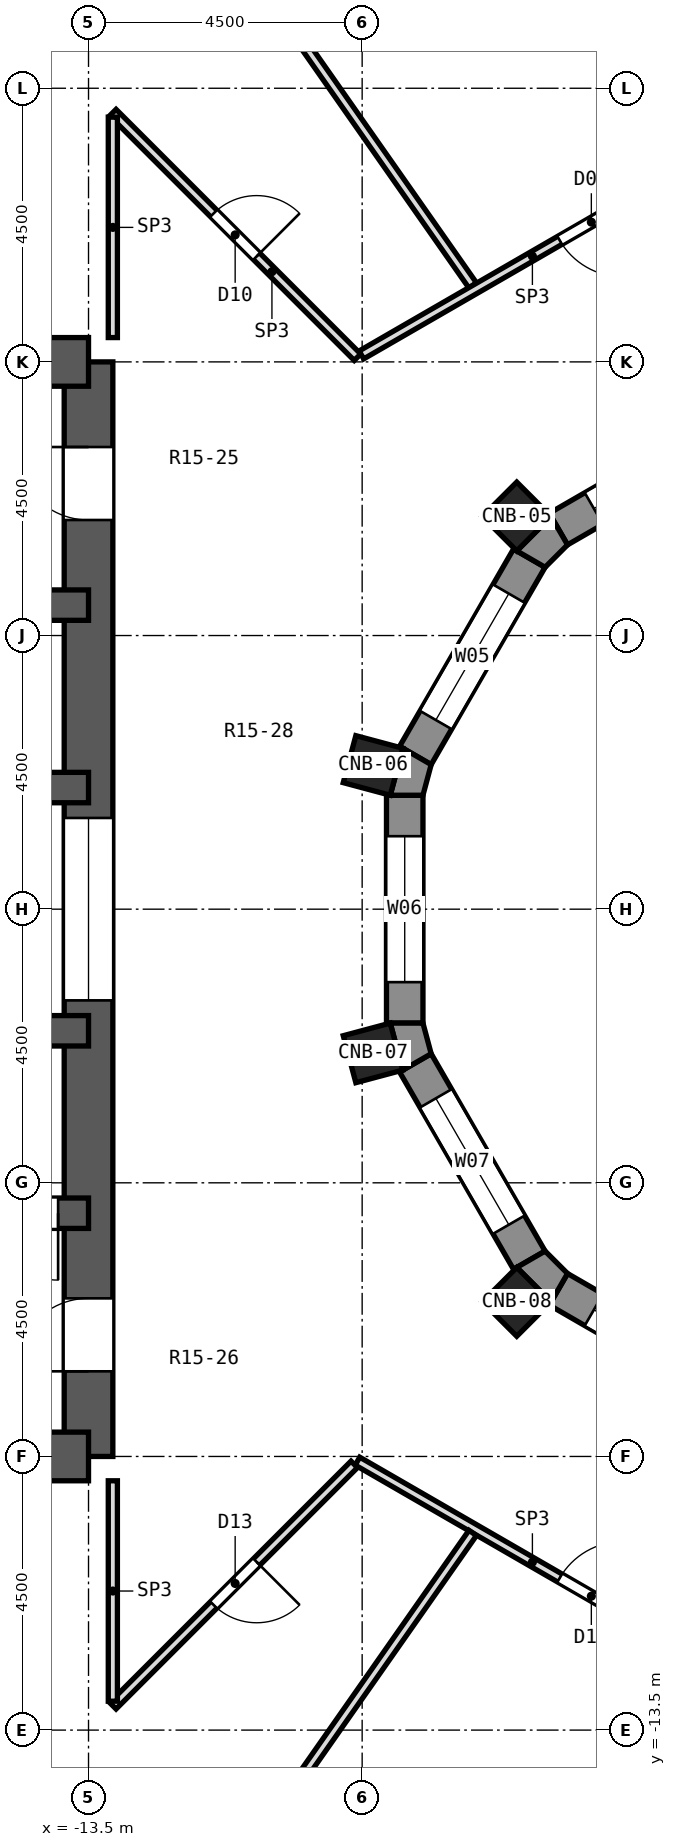
"""IFC4 building model, lengths in metres.
Left out: names, types, materials, properties, quantities, classifications, styles, units other than length and angle.
Written with IfcOpenShell. Run it as: python <this file> out.ifc"""

import sys

from ifc_helpers import new_model, si_unit, direction, frame, frame_2d, origin, origin_2d, place, context, subcontext, project, spatial, polyline, rectangle, outline, extrude, element, fill, save


model = new_model("IFC4")
c1 = context("Model", 3, precision=1e-05, world=origin(), true_north=direction((0.0, 1.0)))
c2 = subcontext(c1, "Body", "Model", "MODEL_VIEW")
j1 = project(units=[si_unit("LENGTHUNIT", "METRE"), si_unit("PLANEANGLEUNIT", "RADIAN")], contexts=[c1])
p1 = place(None, origin())
s1 = spatial("IfcSite", under=j1, at=p1, CompositionType="ELEMENT")
p2 = place(p1, origin())
s2 = spatial("IfcBuilding", under=s1, at=p2, CompositionType="ELEMENT")
p3 = place(p2, frame((0.0, 0.0, 82.4)))
s3 = spatial("IfcBuildingStorey", under=s2, at=p3, CompositionType="ELEMENT", Elevation=82.4)
for number, where, z_axis, x_axis in (
    (1, (-6.458, 6.458, 0.0), (0.0, 0.0, 1.0), (-0.707, 0.707, 0.0)),
    (2, (-8.821, 2.364, 0.0), (0.0, 0.0, 1.0), (-0.966, 0.259, 0.0)),
    (3, (-8.821, -2.364, 0.0), (0.0, 0.0, 1.0), (-0.966, -0.259, 0.0)),
    (4, (-6.458, -6.458, 0.0), (0.0, 0.0, 1.0), (-0.707, -0.707, 0.0)),
):
    element("IfcColumn", number, at=place(p3, frame(where, z_axis=z_axis, x_axis=x_axis)), inside=s3, PredefinedType="COLUMN", context=c2, shape_type="SweptSolid", body=[
        extrude(rectangle(XDim=0.8, YDim=0.8, at=origin_2d()), origin(), (0.0, 0.0, 1.0), 4.5),
    ])
p4 = place(p3, frame((-13.5, -9.0, 0.0), z_axis=(0.0, 0.0, 1.0), x_axis=(0.0, 1.0, 0.0)))
e5 = element("IfcWall", 5, at=p4, inside=s3, PredefinedType="SHEAR", context=c2, shape_type="SweptSolid", body=[
    extrude(rectangle(XDim=18.0, YDim=0.8, at=frame_2d((9.0, 0.0))), origin(), (0.0, 0.0, 1.0), 4.5),
])
p5 = place(p4, frame((15.4, 0.0, 0.0)))
e6 = element("IfcOpeningElement", 6, at=p5, cuts=e5, PredefinedType="OPENING", context=c2, shape_type="SweptSolid", body=[
    extrude(rectangle(XDim=1.2, YDim=2.1, at=frame_2d((0.6, 1.05))), frame((0.0, 0.412, 0.0), z_axis=(0.0, -1.0, 0.0), x_axis=(1.0, 0.0, 0.0)), (0.0, 0.0, 1.0), 0.824),
])
p6 = place(p4, frame((1.4, 0.0, 0.0)))
e7 = element("IfcOpeningElement", 7, at=p6, cuts=e5, PredefinedType="OPENING", context=c2, shape_type="SweptSolid", body=[
    extrude(rectangle(XDim=1.2, YDim=2.1, at=frame_2d((0.6, 1.05))), frame((0.0, 0.412, 0.0), z_axis=(0.0, -1.0, 0.0), x_axis=(1.0, 0.0, 0.0)), (0.0, 0.0, 1.0), 0.824),
])
p7 = place(p4, frame((7.5, 0.0, 0.0)))
e8 = element("IfcOpeningElement", 8, at=p7, cuts=e5, PredefinedType="OPENING", context=c2, shape_type="SweptSolid", body=[
    extrude(rectangle(XDim=3.0, YDim=2.4, at=frame_2d((1.5, 1.2))), frame((0.0, 0.412, 0.0), z_axis=(0.0, -1.0, 0.0), x_axis=(1.0, 0.0, 0.0)), (0.0, 0.0, 1.0), 0.824),
])
for number, where, z_axis, x_axis in (
    (9, (-13.5, 9.0, 0.0), (0.0, 0.0, 1.0), (-1.0, 0.0, 0.0)),
    (10, (-13.5, -9.0, 0.0), (0.0, 0.0, 1.0), (-1.0, 0.0, 0.0)),
):
    element("IfcWall", number, at=place(p3, frame(where, z_axis=z_axis, x_axis=x_axis)), inside=s3, PredefinedType="SHEAR", context=c2, shape_type="SweptSolid", body=[
        extrude(rectangle(XDim=10.4, YDim=0.8, at=frame_2d((5.2, 0.0))), origin(), (0.0, 0.0, 1.0), 4.5),
    ])
p8 = place(p3, frame((-13.5, 5.0, 0.0), z_axis=(0.0, 0.0, 1.0), x_axis=(-1.0, 0.0, 0.0)))
e11 = element("IfcWall", 11, at=p8, inside=s3, PredefinedType="SHEAR", context=c2, shape_type="SweptSolid", body=[
    extrude(rectangle(XDim=10.4, YDim=0.5, at=frame_2d((5.2, 0.0))), origin(), (0.0, 0.0, 1.0), 4.5),
])
p9 = place(p3, frame((-13.5, -5.0, 0.0), z_axis=(0.0, 0.0, 1.0), x_axis=(-1.0, 0.0, 0.0)))
e12 = element("IfcWall", 12, at=p9, inside=s3, PredefinedType="SHEAR", context=c2, shape_type="SweptSolid", body=[
    extrude(rectangle(XDim=10.4, YDim=0.5, at=frame_2d((5.2, 0.0))), origin(), (0.0, 0.0, 1.0), 4.5),
])
p10 = place(p9, frame((0.5, 0.0, 0.0)))
e13 = element("IfcOpeningElement", 13, at=p10, cuts=e12, PredefinedType="OPENING", context=c2, shape_type="SweptSolid", body=[
    extrude(rectangle(XDim=1.1, YDim=2.1, at=frame_2d((0.55, 1.05))), frame((0.0, 0.262, 0.0), z_axis=(0.0, -1.0, 0.0), x_axis=(1.0, 0.0, 0.0)), (0.0, 0.0, 1.0), 0.524),
])
p11 = place(p3, frame((-13.5, 2.0, 0.0), z_axis=(0.0, 0.0, 1.0), x_axis=(-1.0, 0.0, 0.0)))
e14 = element("IfcWall", 14, at=p11, inside=s3, PredefinedType="SHEAR", context=c2, shape_type="SweptSolid", body=[
    extrude(rectangle(XDim=10.4, YDim=0.5, at=frame_2d((5.2, 0.0))), origin(), (0.0, 0.0, 1.0), 4.5),
])
p12 = place(p11, frame((7.65, 0.0, 0.0)))
e15 = element("IfcOpeningElement", 15, at=p12, cuts=e14, PredefinedType="OPENING", context=c2, shape_type="SweptSolid", body=[
    extrude(rectangle(XDim=1.1, YDim=2.1, at=frame_2d((0.55, 1.05))), frame((0.0, 0.262, 0.0), z_axis=(0.0, -1.0, 0.0), x_axis=(1.0, 0.0, 0.0)), (0.0, 0.0, 1.0), 0.524),
])
p13 = place(p11, frame((1.511, 0.0, 0.0)))
e16 = element("IfcOpeningElement", 16, at=p13, cuts=e14, PredefinedType="OPENING", context=c2, shape_type="SweptSolid", body=[
    extrude(rectangle(XDim=0.9, YDim=2.1, at=frame_2d((0.45, 1.05))), frame((0.0, 0.262, 0.0), z_axis=(0.0, -1.0, 0.0), x_axis=(1.0, 0.0, 0.0)), (0.0, 0.0, 1.0), 0.524),
])
p14 = place(p11, frame((3.841, 0.0, 0.0)))
e17 = element("IfcOpeningElement", 17, at=p14, cuts=e14, PredefinedType="OPENING", context=c2, shape_type="SweptSolid", body=[
    extrude(rectangle(XDim=0.9, YDim=2.1, at=frame_2d((0.45, 1.05))), frame((0.0, 0.262, 0.0), z_axis=(0.0, -1.0, 0.0), x_axis=(1.0, 0.0, 0.0)), (0.0, 0.0, 1.0), 0.524),
])
p15 = place(p3, frame((-13.5, -2.0, 0.0), z_axis=(0.0, 0.0, 1.0), x_axis=(-1.0, 0.0, 0.0)))
e18 = element("IfcWall", 18, at=p15, inside=s3, PredefinedType="SHEAR", context=c2, shape_type="SweptSolid", body=[
    extrude(rectangle(XDim=10.4, YDim=0.5, at=frame_2d((5.2, 0.0))), origin(), (0.0, 0.0, 1.0), 4.5),
])
p16 = place(p15, frame((5.62, 0.0, 0.0)))
e19 = element("IfcOpeningElement", 19, at=p16, cuts=e18, PredefinedType="OPENING", context=c2, shape_type="SweptSolid", body=[
    extrude(rectangle(XDim=1.1, YDim=2.1, at=frame_2d((0.55, 1.05))), frame((0.0, 0.262, 0.0), z_axis=(0.0, -1.0, 0.0), x_axis=(1.0, 0.0, 0.0)), (0.0, 0.0, 1.0), 0.524),
])
p17 = place(p15, frame((7.65, 0.0, 0.0)))
e20 = element("IfcOpeningElement", 20, at=p17, cuts=e18, PredefinedType="OPENING", context=c2, shape_type="SweptSolid", body=[
    extrude(rectangle(XDim=1.1, YDim=2.1, at=frame_2d((0.55, 1.05))), frame((0.0, 0.262, 0.0), z_axis=(0.0, -1.0, 0.0), x_axis=(1.0, 0.0, 0.0)), (0.0, 0.0, 1.0), 0.524),
])
p18 = place(p15, frame((1.215, 0.0, 0.0)))
e21 = element("IfcOpeningElement", 21, at=p18, cuts=e18, PredefinedType="OPENING", context=c2, shape_type="SweptSolid", body=[
    extrude(rectangle(XDim=1.0, YDim=2.1, at=frame_2d((0.5, 1.05))), frame((0.0, 0.262, 0.0), z_axis=(0.0, -1.0, 0.0), x_axis=(1.0, 0.0, 0.0)), (0.0, 0.0, 1.0), 0.524),
])
p19 = place(p3, frame((-2.527, 8.125, 0.0), z_axis=(0.0, 0.0, 1.0), x_axis=(-0.86604563398, -0.499964958637, 0.0)))
e22 = element("IfcWall", 22, at=p19, inside=s3, PredefinedType="SOLIDWALL", context=c2, shape_type="SweptSolid", body=[
    extrude(rectangle(XDim=3.747, YDim=0.6, at=frame_2d((1.874, 0.0))), origin(), (0.0, 0.0, 1.0), 3.95),
])
p20 = place(p19, frame((0.674, 0.0, 1.5)))
e23 = element("IfcOpeningElement", 23, at=p20, cuts=e22, PredefinedType="OPENING", context=c2, shape_type="SweptSolid", body=[
    extrude(rectangle(XDim=2.4, YDim=2.0, at=frame_2d((1.2, 1.0))), frame((0.0, 0.312, 0.0), z_axis=(0.0, -1.0, 0.0), x_axis=(1.0, 0.0, 0.0)), (0.0, 0.0, 1.0), 0.624),
])
p21 = place(p3, frame((-6.251, 5.773, 0.0), z_axis=(0.0, 0.0, 1.0), x_axis=(-0.499964958637, -0.86604563398, 0.0)))
e24 = element("IfcWall", 24, at=p21, inside=s3, PredefinedType="SOLIDWALL", context=c2, shape_type="SweptSolid", body=[
    extrude(rectangle(XDim=3.747, YDim=0.6, at=frame_2d((1.874, 0.0))), origin(), (0.0, 0.0, 1.0), 3.95),
])
p22 = place(p21, frame((0.674, 0.0, 1.5)))
e25 = element("IfcOpeningElement", 25, at=p22, cuts=e24, PredefinedType="OPENING", context=c2, shape_type="SweptSolid", body=[
    extrude(rectangle(XDim=2.4, YDim=2.0, at=frame_2d((1.2, 1.0))), frame((0.0, 0.312, 0.0), z_axis=(0.0, -1.0, 0.0), x_axis=(1.0, 0.0, 0.0)), (0.0, 0.0, 1.0), 0.624),
])
p23 = place(p3, frame((-8.3, 1.874, 0.0), z_axis=(0.0, 0.0, 1.0), x_axis=(0.0, -1.0, 0.0)))
e26 = element("IfcWall", 26, at=p23, inside=s3, PredefinedType="SOLIDWALL", context=c2, shape_type="SweptSolid", body=[
    extrude(rectangle(XDim=3.748, YDim=0.6, at=frame_2d((1.874, 0.0))), origin(), (0.0, 0.0, 1.0), 3.95),
])
p24 = place(p23, frame((0.674, 0.0, 1.5)))
e27 = element("IfcOpeningElement", 27, at=p24, cuts=e26, PredefinedType="OPENING", context=c2, shape_type="SweptSolid", body=[
    extrude(rectangle(XDim=2.4, YDim=2.0, at=frame_2d((1.2, 1.0))), frame((0.0, 0.312, 0.0), z_axis=(0.0, -1.0, 0.0), x_axis=(1.0, 0.0, 0.0)), (0.0, 0.0, 1.0), 0.624),
])
p25 = place(p3, frame((-8.125, -2.527, 0.0), z_axis=(0.0, 0.0, 1.0), x_axis=(0.499964958637, -0.86604563398, 0.0)))
e28 = element("IfcWall", 28, at=p25, inside=s3, PredefinedType="SOLIDWALL", context=c2, shape_type="SweptSolid", body=[
    extrude(rectangle(XDim=3.747, YDim=0.6, at=frame_2d((1.874, 0.0))), origin(), (0.0, 0.0, 1.0), 3.95),
])
p26 = place(p25, frame((0.674, 0.0, 1.5)))
e29 = element("IfcOpeningElement", 29, at=p26, cuts=e28, PredefinedType="OPENING", context=c2, shape_type="SweptSolid", body=[
    extrude(rectangle(XDim=2.4, YDim=2.0, at=frame_2d((1.2, 1.0))), frame((0.0, 0.312, 0.0), z_axis=(0.0, -1.0, 0.0), x_axis=(1.0, 0.0, 0.0)), (0.0, 0.0, 1.0), 0.624),
])
p27 = place(p3, frame((-5.773, -6.251, 0.0), z_axis=(0.0, 0.0, 1.0), x_axis=(0.86604563398, -0.499964958637, 0.0)))
e30 = element("IfcWall", 30, at=p27, inside=s3, PredefinedType="SOLIDWALL", context=c2, shape_type="SweptSolid", body=[
    extrude(rectangle(XDim=3.747, YDim=0.6, at=frame_2d((1.874, 0.0))), origin(), (0.0, 0.0, 1.0), 3.95),
])
p28 = place(p27, frame((0.674, 0.0, 1.5)))
e31 = element("IfcOpeningElement", 31, at=p28, cuts=e30, PredefinedType="OPENING", context=c2, shape_type="SweptSolid", body=[
    extrude(rectangle(XDim=2.4, YDim=2.0, at=frame_2d((1.2, 1.0))), frame((0.0, 0.312, 0.0), z_axis=(0.0, -1.0, 0.0), x_axis=(1.0, 0.0, 0.0)), (0.0, 0.0, 1.0), 0.624),
])
p29 = place(p3, origin())
e32 = element("IfcWall", 32, at=p29, inside=s3, PredefinedType="SOLIDWALL", context=c2, shape_type="SweptSolid", body=[
    extrude(outline(polyline([(-6.458, 5.892), (-5.991, 5.623), (-5.623, 5.991), (-5.892, 6.458), (-6.458, 5.892)])), origin(), (0.0, 0.0, 1.0), 3.95),
])
p30 = place(p3, origin())
e33 = element("IfcWall", 33, at=p30, inside=s3, PredefinedType="SOLIDWALL", context=c2, shape_type="SweptSolid", body=[
    extrude(outline(polyline([(-8.538, 1.874), (-8.0, 1.874), (-7.865, 2.377), (-8.331, 2.646), (-8.538, 1.874)])), origin(), (0.0, 0.0, 1.0), 3.95),
])
p31 = place(p3, origin())
e34 = element("IfcWall", 34, at=p31, inside=s3, PredefinedType="SOLIDWALL", context=c2, shape_type="SweptSolid", body=[
    extrude(outline(polyline([(-8.331, -2.646), (-7.865, -2.377), (-8.0, -1.874), (-8.538, -1.874), (-8.331, -2.646)])), origin(), (0.0, 0.0, 1.0), 3.95),
])
p32 = place(p3, origin())
e35 = element("IfcWall", 35, at=p32, inside=s3, PredefinedType="SOLIDWALL", context=c2, shape_type="SweptSolid", body=[
    extrude(outline(polyline([(-6.458, -5.892), (-5.892, -6.458), (-5.623, -5.991), (-5.991, -5.623), (-6.458, -5.892)])), origin(), (0.0, 0.0, 1.0), 3.95),
])
p33 = place(p3, frame((-6.652, 24.824, 0.0), z_axis=(0.0, 0.0, 1.0), x_axis=(0.258824952043, -0.96592424351, 0.0)))
e36 = element("IfcWall", 36, at=p33, inside=s3, PredefinedType="PARTITIONING", context=c2, shape_type="SweptSolid", body=[
    extrude(rectangle(XDim=12.862, YDim=0.15, at=frame_2d((6.431, 0.0))), origin(), (0.0, 0.0, 1.0), 3.95),
])
p34 = place(p3, frame((-14.741, 21.052, 0.0), z_axis=(0.0, 0.0, 1.0), x_axis=(0.573601596314, -0.819134426518, 0.0)))
e37 = element("IfcWall", 37, at=p34, inside=s3, PredefinedType="PARTITIONING", context=c2, shape_type="SweptSolid", body=[
    extrude(rectangle(XDim=13.178, YDim=0.15, at=frame_2d((6.589, 0.0))), origin(), (0.0, 0.0, 1.0), 3.95),
])
p35 = place(p3, frame((-13.1, 13.1, 0.0), z_axis=(0.0, 0.0, 1.0), x_axis=(0.707106781187, -0.707106781187, 0.0)))
e38 = element("IfcWall", 38, at=p35, inside=s3, PredefinedType="PARTITIONING", context=c2, shape_type="SweptSolid", body=[
    extrude(rectangle(XDim=5.69, YDim=0.15, at=frame_2d((2.845, 0.0))), origin(), (0.0, 0.0, 1.0), 3.95),
])
p36 = place(p35, frame((2.345, 0.0, 0.0)))
e39 = element("IfcOpeningElement", 39, at=p36, cuts=e38, PredefinedType="OPENING", context=c2, shape_type="SweptSolid", body=[
    extrude(rectangle(XDim=1.0, YDim=2.1, at=frame_2d((0.5, 1.05))), frame((0.0, 0.087, 0.0), z_axis=(0.0, -1.0, 0.0), x_axis=(1.0, 0.0, 0.0)), (0.0, 0.0, 1.0), 0.174),
])
p37 = place(p3, frame((-9.077, -9.077, 0.0), z_axis=(0.0, 0.0, 1.0), x_axis=(0.865961614908, -0.500110469302, 0.0)))
e40 = element("IfcWall", 40, at=p37, inside=s3, PredefinedType="PARTITIONING", context=c2, shape_type="SweptSolid", body=[
    extrude(rectangle(XDim=6.645, YDim=0.15, at=frame_2d((3.322, 0.0))), origin(), (0.0, 0.0, 1.0), 3.95),
])
p38 = place(p37, frame((3.841, 0.0, 0.0)))
e41 = element("IfcOpeningElement", 41, at=p38, cuts=e40, PredefinedType="OPENING", context=c2, shape_type="SweptSolid", body=[
    extrude(rectangle(XDim=1.2, YDim=2.1, at=frame_2d((0.6, 1.05))), frame((0.0, 0.087, 0.0), z_axis=(0.0, -1.0, 0.0), x_axis=(1.0, 0.0, 0.0)), (0.0, 0.0, 1.0), 0.174),
])
p39 = place(p3, frame((-9.012, 9.115, 0.0), z_axis=(0.0, 0.0, 1.0), x_axis=(0.865967095912, 0.5001009786, 0.0)))
e42 = element("IfcWall", 42, at=p39, inside=s3, PredefinedType="PARTITIONING", context=c2, shape_type="SweptSolid", body=[
    extrude(rectangle(XDim=6.495, YDim=0.15, at=frame_2d((3.248, 0.0))), origin(), (0.0, 0.0, 1.0), 3.95),
])
p40 = place(p39, frame((3.766, 0.0, 0.0)))
e43 = element("IfcOpeningElement", 43, at=p40, cuts=e42, PredefinedType="OPENING", context=c2, shape_type="SweptSolid", body=[
    extrude(rectangle(XDim=1.2, YDim=2.1, at=frame_2d((0.6, 1.05))), frame((0.0, 0.087, 0.0), z_axis=(0.0, -1.0, 0.0), x_axis=(1.0, 0.0, 0.0)), (0.0, 0.0, 1.0), 0.174),
])
p41 = place(p3, frame((-13.1, -13.1, 0.0), z_axis=(0.0, 0.0, 1.0), x_axis=(0.707106781187, 0.707106781187, 0.0)))
e44 = element("IfcWall", 44, at=p41, inside=s3, PredefinedType="PARTITIONING", context=c2, shape_type="SweptSolid", body=[
    extrude(rectangle(XDim=5.615, YDim=0.15, at=frame_2d((2.807, 0.0))), origin(), (0.0, 0.0, 1.0), 3.95),
])
p42 = place(p41, frame((2.345, 0.0, 0.0)))
e45 = element("IfcOpeningElement", 45, at=p42, cuts=e44, PredefinedType="OPENING", context=c2, shape_type="SweptSolid", body=[
    extrude(rectangle(XDim=1.0, YDim=2.1, at=frame_2d((0.5, 1.05))), frame((0.0, 0.087, 0.0), z_axis=(0.0, -1.0, 0.0), x_axis=(1.0, 0.0, 0.0)), (0.0, 0.0, 1.0), 0.174),
])
p43 = place(p3, frame((-14.741, -21.052, 0.0), z_axis=(0.0, 0.0, 1.0), x_axis=(0.573601596314, 0.819134426518, 0.0)))
e46 = element("IfcWall", 46, at=p43, inside=s3, PredefinedType="PARTITIONING", context=c2, shape_type="SweptSolid", body=[
    extrude(rectangle(XDim=13.178, YDim=0.15, at=frame_2d((6.589, 0.0))), origin(), (0.0, 0.0, 1.0), 3.95),
])
p44 = place(p3, frame((-6.652, -24.824, 0.0), z_axis=(0.0, 0.0, 1.0), x_axis=(0.258835334672, 0.965921461365, 0.0)))
e47 = element("IfcWall", 47, at=p44, inside=s3, PredefinedType="PARTITIONING", context=c2, shape_type="SweptSolid", body=[
    extrude(rectangle(XDim=12.787, YDim=0.15, at=frame_2d((6.394, 0.0))), origin(), (0.0, 0.0, 1.0), 3.95),
])
for number, where, z_axis, x_axis in (
    (48, (-13.1, -13.025, 0.0), (0.0, 0.0, 1.0), (0.0, 1.0, 0.0)),
    (49, (-13.1, 9.4, 0.0), (0.0, 0.0, 1.0), (0.0, 1.0, 0.0)),
):
    element("IfcWall", number, at=place(p3, frame(where, z_axis=z_axis, x_axis=x_axis)), inside=s3, PredefinedType="PARTITIONING", context=c2, shape_type="SweptSolid", body=[
        extrude(rectangle(XDim=3.625, YDim=0.15, at=frame_2d((1.812, 0.0))), origin(), (0.0, 0.0, 1.0), 3.95),
    ])
p45 = place(p20, origin())
e50 = element("IfcWindow", 50, at=p45, inside=s3, PartitioningType="SINGLE_PANEL", PredefinedType="WINDOW", context=c2, shape_type="SweptSolid", body=[
    extrude(rectangle(XDim=2.4, YDim=2.0, at=frame_2d((1.2, 1.0))), frame((0.0, -0.12, 0.0), z_axis=(0.0, -1.0, 0.0), x_axis=(1.0, 0.0, 0.0)), (0.0, 0.0, 1.0), 0.06),
])
fill(e23, e50)
p46 = place(p22, origin())
e51 = element("IfcWindow", 51, at=p46, inside=s3, PartitioningType="SINGLE_PANEL", PredefinedType="WINDOW", context=c2, shape_type="SweptSolid", body=[
    extrude(rectangle(XDim=2.4, YDim=2.0, at=frame_2d((1.2, 1.0))), frame((0.0, -0.12, 0.0), z_axis=(0.0, -1.0, 0.0), x_axis=(1.0, 0.0, 0.0)), (0.0, 0.0, 1.0), 0.06),
])
fill(e25, e51)
p47 = place(p24, origin())
e52 = element("IfcWindow", 52, at=p47, inside=s3, PartitioningType="SINGLE_PANEL", PredefinedType="WINDOW", context=c2, shape_type="SweptSolid", body=[
    extrude(rectangle(XDim=2.4, YDim=2.0, at=frame_2d((1.2, 1.0))), frame((0.0, -0.12, 0.0), z_axis=(0.0, -1.0, 0.0), x_axis=(1.0, 0.0, 0.0)), (0.0, 0.0, 1.0), 0.06),
])
fill(e27, e52)
p48 = place(p26, origin())
e53 = element("IfcWindow", 53, at=p48, inside=s3, PartitioningType="SINGLE_PANEL", PredefinedType="WINDOW", context=c2, shape_type="SweptSolid", body=[
    extrude(rectangle(XDim=2.4, YDim=2.0, at=frame_2d((1.2, 1.0))), frame((0.0, -0.12, 0.0), z_axis=(0.0, -1.0, 0.0), x_axis=(1.0, 0.0, 0.0)), (0.0, 0.0, 1.0), 0.06),
])
fill(e29, e53)
p49 = place(p28, origin())
e54 = element("IfcWindow", 54, at=p49, inside=s3, PartitioningType="SINGLE_PANEL", PredefinedType="WINDOW", context=c2, shape_type="SweptSolid", body=[
    extrude(rectangle(XDim=2.4, YDim=2.0, at=frame_2d((1.2, 1.0))), frame((0.0, -0.12, 0.0), z_axis=(0.0, -1.0, 0.0), x_axis=(1.0, 0.0, 0.0)), (0.0, 0.0, 1.0), 0.06),
])
fill(e31, e54)
p50 = place(p40, frame((1.2, 0.0, 0.0), z_axis=(0.0, 0.0, 1.0), x_axis=(-1.0, 0.0, 0.0)))
e55 = element("IfcDoor", 55, at=p50, inside=s3, OperationType="SINGLE_SWING_LEFT", PredefinedType="DOOR", context=c2, shape_type="SweptSolid", body=[
    extrude(rectangle(XDim=1.2, YDim=2.1, at=frame_2d((0.6, 1.05))), frame((0.0, 0.025, 0.0), z_axis=(0.0, -1.0, 0.0), x_axis=(1.0, 0.0, 0.0)), (0.0, 0.0, 1.0), 0.05),
])
fill(e43, e55)
p51 = place(p36, origin())
e56 = element("IfcDoor", 56, at=p51, inside=s3, OperationType="SINGLE_SWING_RIGHT", PredefinedType="DOOR", context=c2, shape_type="SweptSolid", body=[
    extrude(rectangle(XDim=1.0, YDim=2.1, at=frame_2d((0.5, 1.05))), frame((0.0, 0.025, 0.0), z_axis=(0.0, -1.0, 0.0), x_axis=(1.0, 0.0, 0.0)), (0.0, 0.0, 1.0), 0.05),
])
fill(e39, e56)
p52 = place(p42, frame((1.0, 0.0, 0.0), z_axis=(0.0, 0.0, 1.0), x_axis=(-1.0, 0.0, 0.0)))
e57 = element("IfcDoor", 57, at=p52, inside=s3, OperationType="SINGLE_SWING_LEFT", PredefinedType="DOOR", context=c2, shape_type="SweptSolid", body=[
    extrude(rectangle(XDim=1.0, YDim=2.1, at=frame_2d((0.5, 1.05))), frame((0.0, 0.025, 0.0), z_axis=(0.0, -1.0, 0.0), x_axis=(1.0, 0.0, 0.0)), (0.0, 0.0, 1.0), 0.05),
])
fill(e45, e57)
p53 = place(p38, origin())
e58 = element("IfcDoor", 58, at=p53, inside=s3, OperationType="SINGLE_SWING_RIGHT", PredefinedType="DOOR", context=c2, shape_type="SweptSolid", body=[
    extrude(rectangle(XDim=1.2, YDim=2.1, at=frame_2d((0.6, 1.05))), frame((0.0, 0.025, 0.0), z_axis=(0.0, -1.0, 0.0), x_axis=(1.0, 0.0, 0.0)), (0.0, 0.0, 1.0), 0.05),
])
fill(e41, e58)
p54 = place(p10, origin())
e59 = element("IfcDoor", 59, at=p54, inside=s3, OperationType="SINGLE_SWING_LEFT", PredefinedType="DOOR", context=c2, shape_type="SweptSolid", body=[
    extrude(rectangle(XDim=1.1, YDim=2.1, at=frame_2d((0.55, 1.05))), frame((0.0, 0.025, 0.0), z_axis=(0.0, -1.0, 0.0), x_axis=(1.0, 0.0, 0.0)), (0.0, 0.0, 1.0), 0.05),
])
fill(e13, e59)
p55 = place(p5, origin())
e60 = element("IfcDoor", 60, at=p55, inside=s3, OperationType="SINGLE_SWING_RIGHT", PredefinedType="DOOR", context=c2, shape_type="SweptSolid", body=[
    extrude(rectangle(XDim=1.2, YDim=2.1, at=frame_2d((0.6, 1.05))), frame((0.0, 0.025, 0.0), z_axis=(0.0, -1.0, 0.0), x_axis=(1.0, 0.0, 0.0)), (0.0, 0.0, 1.0), 0.05),
])
fill(e6, e60)
p56 = place(p6, origin())
e61 = element("IfcDoor", 61, at=p56, inside=s3, OperationType="SINGLE_SWING_LEFT", PredefinedType="DOOR", context=c2, shape_type="SweptSolid", body=[
    extrude(rectangle(XDim=1.2, YDim=2.1, at=frame_2d((0.6, 1.05))), frame((0.0, 0.025, 0.0), z_axis=(0.0, -1.0, 0.0), x_axis=(1.0, 0.0, 0.0)), (0.0, 0.0, 1.0), 0.05),
])
fill(e7, e61)
p57 = place(p7, origin())
e62 = element("IfcDoor", 62, at=p57, inside=s3, OperationType="DOUBLE_DOOR_SLIDING", PredefinedType="DOOR", context=c2, shape_type="SweptSolid", body=[
    extrude(rectangle(XDim=3.0, YDim=2.4, at=frame_2d((1.5, 1.2))), frame((0.0, 0.025, 0.0), z_axis=(0.0, -1.0, 0.0), x_axis=(1.0, 0.0, 0.0)), (0.0, 0.0, 1.0), 0.05),
])
fill(e8, e62)
save(model, sys.argv[1])
